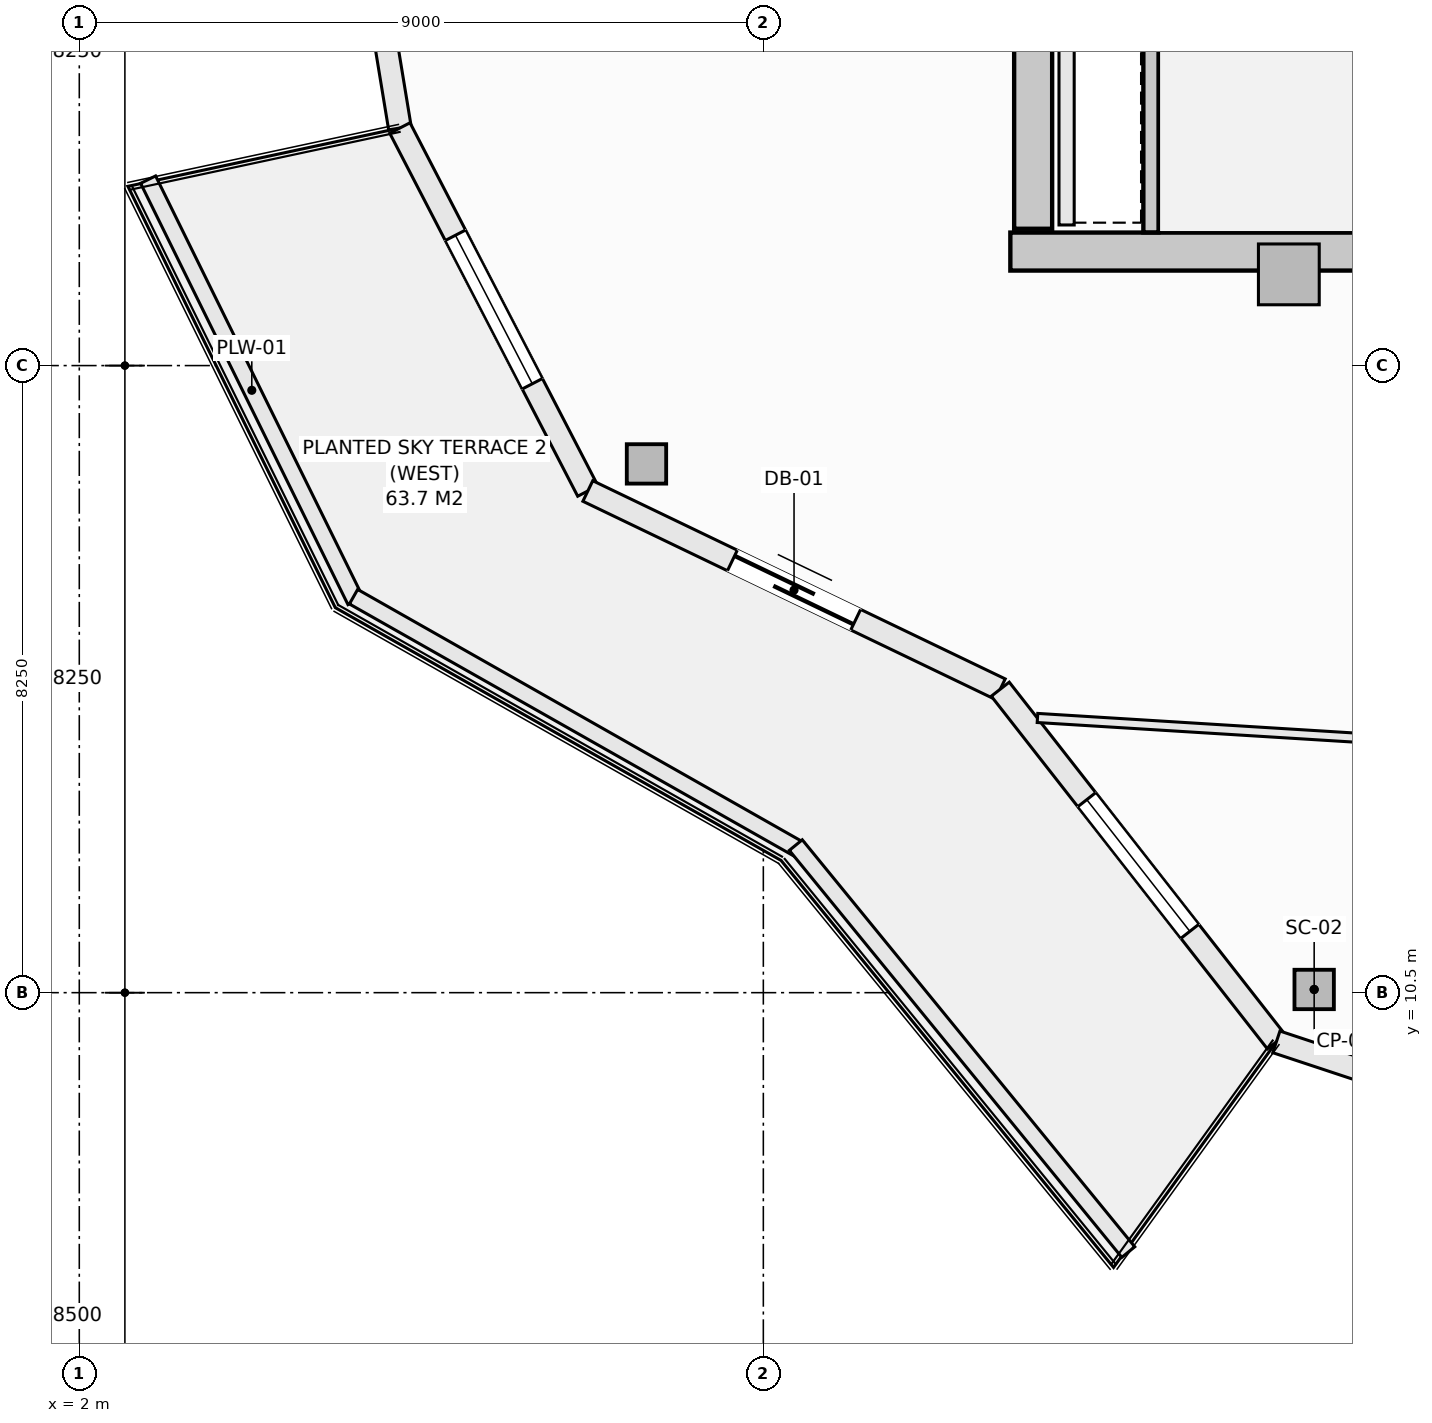
"""IFC4 building model, lengths in metres.
Left out: names, types, materials, properties, quantities, classifications, styles, units other than length and angle.
Written with IfcOpenShell. Run it as: python <this file> out.ifc"""

import sys

from ifc_helpers import new_model, si_unit, direction, frame, frame_2d, origin, origin_2d, place, context, subcontext, project, spatial, rectangle, hollow_rectangle, extrude, element, fill, save


model = new_model("IFC4")
c1 = context("Model", 3, precision=1e-05, world=origin(), true_north=direction((0.0, 1.0)))
c2 = subcontext(c1, "Body", "Model", "MODEL_VIEW")
j1 = project(units=[si_unit("LENGTHUNIT", "METRE"), si_unit("PLANEANGLEUNIT", "RADIAN")], contexts=[c1])
p1 = place(None, origin())
s1 = spatial("IfcSite", under=j1, at=p1, CompositionType="ELEMENT")
p2 = place(p1, origin())
s2 = spatial("IfcBuilding", under=s1, at=p2, CompositionType="ELEMENT")
p3 = place(p2, frame((0.0, 0.0, 236.0)))
s3 = spatial("IfcBuildingStorey", under=s2, at=p3, CompositionType="ELEMENT", Elevation=236.0)
p4 = place(p3, frame((14.25, 20.25, -0.27), z_axis=(0.0, 0.0, 1.0), x_axis=(1.0, 0.0, 0.0)))
e1 = element("IfcWall", 1, at=p4, inside=s3, PredefinedType="SHEAR", context=c2, shape_type="SweptSolid", body=[
    extrude(rectangle(XDim=13.5, YDim=0.5, at=frame_2d((6.75, 0.0))), origin(), (0.0, 0.0, 1.0), 3.3),
])
p5 = place(p3, frame((14.55, 20.55, -0.27), z_axis=(0.0, 0.0, 1.0), x_axis=(0.0, 1.0, 0.0)))
e2 = element("IfcWall", 2, at=p5, inside=s3, PredefinedType="SHEAR", context=c2, shape_type="SweptSolid", body=[
    extrude(rectangle(XDim=12.9, YDim=0.5, at=frame_2d((6.45, 0.0))), origin(), (0.0, 0.0, 1.0), 3.3),
])
for number, where, z_axis, x_axis in (
    (3, (9.463, 17.456, -0.27), (0.0, 0.0, 1.0), (1.0, 0.0, 0.0)),
    (4, (18.247, 10.542, -0.27), (0.0, 0.0, 1.0), (1.0, 0.0, 0.0)),
):
    element("IfcColumn", number, at=place(p3, frame(where, z_axis=z_axis, x_axis=x_axis)), inside=s3, PredefinedType="COLUMN", context=c2, shape_type="SweptSolid", body=[
        extrude(hollow_rectangle(XDim=0.508, YDim=0.508, WallThickness=0.019, at=origin_2d()), origin(), (0.0, 0.0, 1.0), 3.3),
    ])
p6 = place(p3, frame((17.914, 19.95, -0.27), z_axis=(0.0, 0.0, 1.0), x_axis=(1.0, 0.0, 0.0)))
e5 = element("IfcColumn", 5, at=p6, inside=s3, PredefinedType="PILASTER", context=c2, shape_type="SweptSolid", body=[
    extrude(rectangle(XDim=0.8, YDim=0.8, at=origin_2d()), origin(), (0.0, 0.0, 1.0), 3.3),
])
p7 = place(p3, frame((5.375, 27.0, 0.0), z_axis=(0.0, 0.0, 1.0), x_axis=(0.16237087798, -0.986729799886, 0.0)))
e6 = element("IfcWall", 6, at=p7, inside=s3, PredefinedType="SOLIDWALL", context=c2, shape_type="SweptSolid", body=[
    extrude(rectangle(XDim=5.193, YDim=0.3, at=frame_2d((2.597, 0.0))), origin(), (0.0, 0.0, 1.0), 2.605),
])
p8 = place(p7, frame((1.497, 0.0, 0.72)))
e7 = element("IfcOpeningElement", 7, at=p8, cuts=e6, PredefinedType="OPENING", context=c2, shape_type="SweptSolid", body=[
    extrude(rectangle(XDim=2.2, YDim=1.65, at=frame_2d((1.1, 0.825))), frame((0.0, 0.16, 0.0), z_axis=(0.0, -1.0, 0.0), x_axis=(1.0, 0.0, 0.0)), (0.0, 0.0, 1.0), 0.32),
])
p9 = place(p3, frame((6.218, 21.875, 0.0), z_axis=(0.0, 0.0, 1.0), x_axis=(0.459808219482, -0.888018243786, 0.0)))
e8 = element("IfcWall", 8, at=p9, inside=s3, PredefinedType="SOLIDWALL", context=c2, shape_type="SweptSolid", body=[
    extrude(rectangle(XDim=5.378, YDim=0.3, at=frame_2d((2.689, 0.0))), origin(), (0.0, 0.0, 1.0), 2.605),
])
p10 = place(p9, frame((1.589, 0.0, 0.72)))
e9 = element("IfcOpeningElement", 9, at=p10, cuts=e8, PredefinedType="OPENING", context=c2, shape_type="SweptSolid", body=[
    extrude(rectangle(XDim=2.2, YDim=1.65, at=frame_2d((1.1, 0.825))), frame((0.0, 0.16, 0.0), z_axis=(0.0, -1.0, 0.0), x_axis=(1.0, 0.0, 0.0)), (0.0, 0.0, 1.0), 0.32),
])
p11 = place(p3, frame((8.691, 17.1, 0.0), z_axis=(0.0, 0.0, 1.0), x_axis=(0.901348331142, -0.433094892545, 0.0)))
e10 = element("IfcWall", 10, at=p11, inside=s3, PredefinedType="SOLIDWALL", context=c2, shape_type="SweptSolid", body=[
    extrude(rectangle(XDim=6.021, YDim=0.3, at=frame_2d((3.01, 0.0))), origin(), (0.0, 0.0, 1.0), 2.605),
])
p12 = place(p11, frame((2.11, 0.0, 0.0)))
e11 = element("IfcOpeningElement", 11, at=p12, cuts=e10, PredefinedType="OPENING", context=c2, shape_type="SweptSolid", body=[
    extrude(rectangle(XDim=1.8, YDim=2.25, at=frame_2d((0.9, 1.125))), frame((0.0, 0.16, 0.0), z_axis=(0.0, -1.0, 0.0), x_axis=(1.0, 0.0, 0.0)), (0.0, 0.0, 1.0), 0.32),
])
p13 = place(p3, frame((14.117, 14.493, 0.0), z_axis=(0.0, 0.0, 1.0), x_axis=(0.616450126935, -0.787393955401, 0.0)))
e12 = element("IfcWall", 12, at=p13, inside=s3, PredefinedType="SOLIDWALL", context=c2, shape_type="SweptSolid", body=[
    extrude(rectangle(XDim=5.893, YDim=0.3, at=frame_2d((2.946, 0.0))), origin(), (0.0, 0.0, 1.0), 2.605),
])
p14 = place(p13, frame((1.846, 0.0, 0.72)))
e13 = element("IfcOpeningElement", 13, at=p14, cuts=e12, PredefinedType="OPENING", context=c2, shape_type="SweptSolid", body=[
    extrude(rectangle(XDim=2.2, YDim=1.65, at=frame_2d((1.1, 0.825))), frame((0.0, 0.16, 0.0), z_axis=(0.0, -1.0, 0.0), x_axis=(1.0, 0.0, 0.0)), (0.0, 0.0, 1.0), 0.32),
])
p15 = place(p3, frame((17.75, 9.853, 0.0), z_axis=(0.0, 0.0, 1.0), x_axis=(0.949240877604, -0.314550085495, 0.0)))
e14 = element("IfcWall", 14, at=p15, inside=s3, PredefinedType="SOLIDWALL", context=c2, shape_type="SweptSolid", body=[
    extrude(rectangle(XDim=6.288, YDim=0.3, at=frame_2d((3.144, 0.0))), origin(), (0.0, 0.0, 1.0), 2.605),
])
p16 = place(p15, frame((2.044, 0.0, 0.72)))
e15 = element("IfcOpeningElement", 15, at=p16, cuts=e14, PredefinedType="OPENING", context=c2, shape_type="SweptSolid", body=[
    extrude(rectangle(XDim=2.2, YDim=1.65, at=frame_2d((1.1, 0.825))), frame((0.0, 0.16, 0.0), z_axis=(0.0, -1.0, 0.0), x_axis=(1.0, 0.0, 0.0)), (0.0, 0.0, 1.0), 0.32),
])
p17 = place(p3, frame((2.906, 21.196, 0.0), z_axis=(0.0, 0.0, 1.0), x_axis=(0.441640961804, -0.897191875162, 0.0)))
e16 = element("IfcWall", 16, at=p17, inside=s3, PredefinedType="PARAPET", context=c2, shape_type="SweptSolid", body=[
    extrude(rectangle(XDim=6.178, YDim=0.22, at=frame_2d((3.089, 0.0))), origin(), (0.0, 0.0, 1.0), 0.52),
])
p18 = place(p3, frame((5.608, 15.709, 0.0), z_axis=(0.0, 0.0, 1.0), x_axis=(0.869860619267, -0.493297580623, 0.0)))
e17 = element("IfcWall", 17, at=p18, inside=s3, PredefinedType="PARAPET", context=c2, shape_type="SweptSolid", body=[
    extrude(rectangle(XDim=6.743, YDim=0.22, at=frame_2d((3.371, 0.0))), origin(), (0.0, 0.0, 1.0), 0.52),
])
p19 = place(p3, frame((11.427, 12.441, 0.0), z_axis=(0.0, 0.0, 1.0), x_axis=(0.632697312147, -0.774399193699, 0.0)))
e18 = element("IfcWall", 18, at=p19, inside=s3, PredefinedType="PARAPET", context=c2, shape_type="SweptSolid", body=[
    extrude(rectangle(XDim=6.914, YDim=0.22, at=frame_2d((3.457, 0.0))), origin(), (0.0, 0.0, 1.0), 0.52),
])
p20 = place(p3, frame((16.1, 20.502, -0.27), z_axis=(0.0, 0.0, 1.0), x_axis=(0.0, 1.0, 0.0)))
e19 = element("IfcWall", 19, at=p20, inside=s3, PredefinedType="SHEAR", context=c2, shape_type="SweptSolid", body=[
    extrude(rectangle(XDim=3.036, YDim=0.2, at=frame_2d((1.518, 0.0))), origin(), (0.0, 0.0, 1.0), 3.3),
])
p21 = place(p3, frame((14.99, 20.6, 0.0), z_axis=(0.0, 0.0, 1.0), x_axis=(0.0, 1.0, 0.0)))
e20 = element("IfcWall", 20, at=p21, inside=s3, PredefinedType="SOLIDWALL", context=c2, shape_type="SweptSolid", body=[
    extrude(rectangle(XDim=2.85, YDim=0.2, at=frame_2d((1.425, 0.0))), origin(), (0.0, 0.0, 1.0), 3.03),
])
p22 = place(p3, frame((14.607, 14.114, 0.0), z_axis=(0.0, 0.0, 1.0), x_axis=(0.998091702445, -0.061749117487, 0.0)))
e21 = element("IfcWall", 21, at=p22, inside=s3, PredefinedType="PARTITIONING", context=c2, shape_type="SweptSolid", body=[
    extrude(rectangle(XDim=12.49, YDim=0.12, at=frame_2d((6.245, 0.0))), origin(), (0.0, 0.0, 1.0), 3.03),
])
p23 = place(p10, origin())
e22 = element("IfcWindow", 22, at=p23, inside=s3, PartitioningType="SINGLE_PANEL", PredefinedType="WINDOW", context=c2, shape_type="SweptSolid", body=[
    extrude(rectangle(XDim=2.2, YDim=1.65, at=frame_2d((1.1, 0.825))), frame((0.0, 0.03, 0.0), z_axis=(0.0, -1.0, 0.0), x_axis=(1.0, 0.0, 0.0)), (0.0, 0.0, 1.0), 0.06),
])
fill(e9, e22)
p24 = place(p12, frame((1.8, 0.0, 0.0), z_axis=(0.0, 0.0, 1.0), x_axis=(-1.0, 0.0, 0.0)))
e23 = element("IfcDoor", 23, at=p24, inside=s3, OperationType="SLIDING_TO_LEFT", PredefinedType="DOOR", context=c2, shape_type="SweptSolid", body=[
    extrude(rectangle(XDim=1.8, YDim=2.25, at=frame_2d((0.9, 1.125))), frame((0.0, 0.025, 0.0), z_axis=(0.0, -1.0, 0.0), x_axis=(1.0, 0.0, 0.0)), (0.0, 0.0, 1.0), 0.05),
])
fill(e11, e23)
p25 = place(p14, origin())
e24 = element("IfcWindow", 24, at=p25, inside=s3, PartitioningType="SINGLE_PANEL", PredefinedType="WINDOW", context=c2, shape_type="SweptSolid", body=[
    extrude(rectangle(XDim=2.2, YDim=1.65, at=frame_2d((1.1, 0.825))), frame((0.0, 0.03, 0.0), z_axis=(0.0, -1.0, 0.0), x_axis=(1.0, 0.0, 0.0)), (0.0, 0.0, 1.0), 0.06),
])
fill(e13, e24)
save(model, sys.argv[1])
